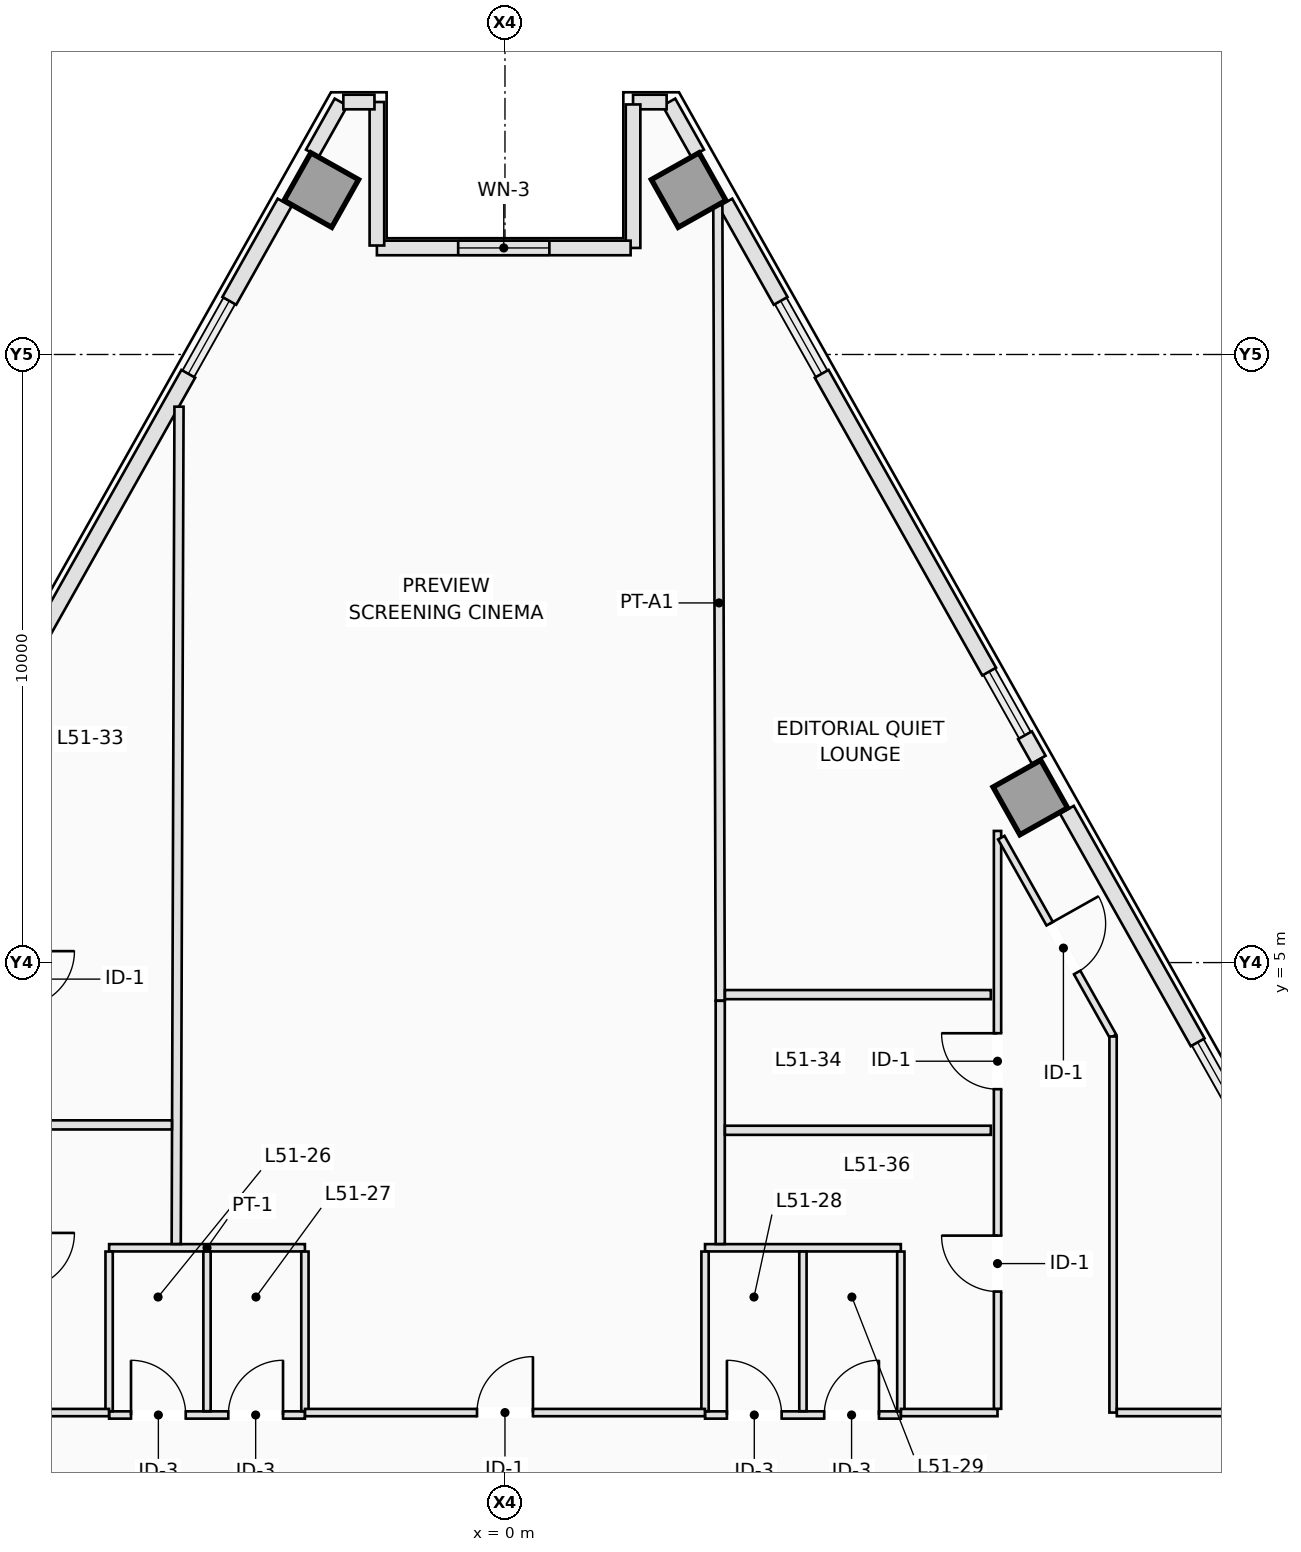
"""IFC4 building model, lengths in metres.
Left out: names, types, materials, properties, quantities, classifications, styles, units other than length and angle.
Written with IfcOpenShell. Run it as: python <this file> out.ifc"""

import sys

from ifc_helpers import new_model, si_unit, direction, frame, frame_2d, origin, origin_2d, place, context, subcontext, project, spatial, rectangle, extrude, element, fill, save


model = new_model("IFC4")
c1 = context("Model", 3, precision=1e-05, world=origin(), true_north=direction((0.0, 1.0)))
c2 = subcontext(c1, "Body", "Model", "MODEL_VIEW")
j1 = project(units=[si_unit("LENGTHUNIT", "METRE"), si_unit("PLANEANGLEUNIT", "RADIAN")], contexts=[c1])
p1 = place(None, origin())
s1 = spatial("IfcSite", under=j1, at=p1, CompositionType="ELEMENT")
p2 = place(p1, origin())
s2 = spatial("IfcBuilding", under=s1, at=p2, CompositionType="ELEMENT")
p3 = place(p2, frame((0.0, 0.0, 186.9)))
s3 = spatial("IfcBuildingStorey", under=s2, at=p3, CompositionType="ELEMENT", Elevation=186.9)
for number, where, z_axis, x_axis in (
    (1, (8.64, 7.715, 0.0), (0.0, 0.0, 1.0), (0.872, 0.49, 0.0)),
    (2, (3.021, 17.704, 0.0), (0.0, 0.0, 1.0), (0.872, 0.49, 0.0)),
    (3, (-3.021, 17.704, 0.0), (0.0, 0.0, 1.0), (-0.872, 0.49, 0.0)),
):
    element("IfcColumn", number, at=place(p3, frame(where, z_axis=z_axis, x_axis=x_axis)), inside=s3, PredefinedType="COLUMN", context=c2, shape_type="SweptSolid", body=[
        extrude(rectangle(XDim=0.9, YDim=0.9, at=origin_2d()), origin(), (0.0, 0.0, 1.0), 3.5),
    ])
p4 = place(p3, frame((2.695, 19.149, 0.0), z_axis=(0.0, 0.0, 1.0), x_axis=(0.490345412687, -0.87152818443, 0.0)))
e4 = element("IfcWall", 4, at=p4, inside=s3, PredefinedType="STANDARD", context=c2, shape_type="SweptSolid", body=[
    extrude(rectangle(XDim=0.964, YDim=0.24, at=frame_2d((0.482, 0.0))), origin(), (0.0, 0.0, 1.0), 3.25),
])
p5 = place(p3, frame((3.624, 17.499, 0.0), z_axis=(0.0, 0.0, 1.0), x_axis=(0.490261239633, -0.871575537125, 0.0)))
e5 = element("IfcWall", 5, at=p5, inside=s3, PredefinedType="STANDARD", context=c2, shape_type="SweptSolid", body=[
    extrude(rectangle(XDim=1.855, YDim=0.26, at=frame_2d((0.928, 0.0))), origin(), (0.0, 0.0, 1.0), 3.25),
])
p6 = place(p3, frame((5.208, 14.682, 0.0), z_axis=(0.0, 0.0, 1.0), x_axis=(0.490240608828, -0.871587141631, 0.0)))
e6 = element("IfcWall", 6, at=p6, inside=s3, PredefinedType="STANDARD", context=c2, shape_type="SweptSolid", body=[
    extrude(rectangle(XDim=5.618, YDim=0.26, at=frame_2d((2.809, 0.0))), origin(), (0.0, 0.0, 1.0), 3.25),
])
p7 = place(p3, frame((8.552, 8.738, 0.0), z_axis=(0.0, 0.0, 1.0), x_axis=(0.490412424957, -0.871490478116, 0.0)))
e7 = element("IfcWall", 7, at=p7, inside=s3, PredefinedType="STANDARD", context=c2, shape_type="SweptSolid", body=[
    extrude(rectangle(XDim=0.46, YDim=0.26, at=frame_2d((0.23, 0.0))), origin(), (0.0, 0.0, 1.0), 3.25),
])
p8 = place(p3, frame((9.24, 7.514, 0.0), z_axis=(0.0, 0.0, 1.0), x_axis=(0.490237464814, -0.871588910033, 0.0)))
e8 = element("IfcWall", 8, at=p8, inside=s3, PredefinedType="STANDARD", context=c2, shape_type="SweptSolid", body=[
    extrude(rectangle(XDim=4.388, YDim=0.26, at=frame_2d((2.194, 0.0))), origin(), (0.0, 0.0, 1.0), 3.25),
])
p9 = place(p3, frame((-3.168, 18.309, 0.0), z_axis=(0.0, 0.0, 1.0), x_axis=(0.490345412687, 0.87152818443, 0.0)))
e9 = element("IfcWall", 9, at=p9, inside=s3, PredefinedType="STANDARD", context=c2, shape_type="SweptSolid", body=[
    extrude(rectangle(XDim=0.964, YDim=0.24, at=frame_2d((0.482, 0.0))), origin(), (0.0, 0.0, 1.0), 3.25),
])
p10 = place(p3, frame((-7.962, 9.785, 0.0), z_axis=(0.0, 0.0, 1.0), x_axis=(0.490240608828, 0.871587141631, 0.0)))
e10 = element("IfcWall", 10, at=p10, inside=s3, PredefinedType="STANDARD", context=c2, shape_type="SweptSolid", body=[
    extrude(rectangle(XDim=5.618, YDim=0.26, at=frame_2d((2.809, 0.0))), origin(), (0.0, 0.0, 1.0), 3.25),
])
p11 = place(p3, frame((-4.533, 15.882, 0.0), z_axis=(0.0, 0.0, 1.0), x_axis=(0.490261239633, 0.871575537125, 0.0)))
e11 = element("IfcWall", 11, at=p11, inside=s3, PredefinedType="STANDARD", context=c2, shape_type="SweptSolid", body=[
    extrude(rectangle(XDim=1.855, YDim=0.26, at=frame_2d((0.928, 0.0))), origin(), (0.0, 0.0, 1.0), 3.25),
])
p12 = place(p3, frame((2.658, 19.152, 0.0), z_axis=(0.0, 0.0, 1.0), x_axis=(-1.0, 0.0, 0.0)))
e12 = element("IfcWall", 12, at=p12, inside=s3, PredefinedType="STANDARD", context=c2, shape_type="SweptSolid", body=[
    extrude(rectangle(XDim=0.552, YDim=0.24, at=frame_2d((0.276, 0.0))), origin(), (0.0, 0.0, 1.0), 3.25),
])
p13 = place(p3, frame((2.106, 19.112, 0.0), z_axis=(0.0, 0.0, 1.0), x_axis=(0.0, -1.0, 0.0)))
e13 = element("IfcWall", 13, at=p13, inside=s3, PredefinedType="STANDARD", context=c2, shape_type="SweptSolid", body=[
    extrude(rectangle(XDim=2.36, YDim=0.24, at=frame_2d((1.18, 0.0))), origin(), (0.0, 0.0, 1.0), 3.25),
])
p14 = place(p3, frame((2.066, 16.752, 0.0), z_axis=(0.0, 0.0, 1.0), x_axis=(-1.0, 0.0, 0.0)))
e14 = element("IfcWall", 14, at=p14, inside=s3, PredefinedType="STANDARD", context=c2, shape_type="SweptSolid", body=[
    extrude(rectangle(XDim=4.172, YDim=0.24, at=frame_2d((2.086, 0.0))), origin(), (0.0, 0.0, 1.0), 3.25),
])
p15 = place(p14, frame((1.336, 0.0, 0.9)))
e15 = element("IfcOpeningElement", 15, at=p15, cuts=e14, PredefinedType="OPENING", context=c2, shape_type="SweptSolid", body=[
    extrude(rectangle(XDim=1.5, YDim=1.95, at=frame_2d((0.75, 0.975))), frame((0.0, 0.13, 0.0), z_axis=(0.0, -1.0, 0.0), x_axis=(1.0, 0.0, 0.0)), (0.0, 0.0, 1.0), 0.26),
])
p16 = place(p3, frame((-2.106, 16.792, 0.0), z_axis=(0.0, 0.0, 1.0), x_axis=(0.0, 1.0, 0.0)))
e16 = element("IfcWall", 16, at=p16, inside=s3, PredefinedType="STANDARD", context=c2, shape_type="SweptSolid", body=[
    extrude(rectangle(XDim=2.36, YDim=0.24, at=frame_2d((1.18, 0.0))), origin(), (0.0, 0.0, 1.0), 3.25),
])
p17 = place(p3, frame((-2.146, 19.152, 0.0), z_axis=(0.0, 0.0, 1.0), x_axis=(-1.0, 0.0, 0.0)))
e17 = element("IfcWall", 17, at=p17, inside=s3, PredefinedType="STANDARD", context=c2, shape_type="SweptSolid", body=[
    extrude(rectangle(XDim=0.512, YDim=0.24, at=frame_2d((0.256, 0.0))), origin(), (0.0, 0.0, 1.0), 3.25),
])
p18 = place(p3, frame((-6.51, -2.44, 0.0), z_axis=(0.0, 0.0, 1.0), x_axis=(1.0, 0.0, 0.0)))
e18 = element("IfcWall", 18, at=p18, inside=s3, PredefinedType="PARTITIONING", context=c2, shape_type="SweptSolid", body=[
    extrude(rectangle(XDim=3.22, YDim=0.12, at=frame_2d((1.61, 0.0))), origin(), (0.0, 0.0, 1.0), 2.943),
])
p19 = place(p18, frame((0.36, 0.0, 0.0)))
e19 = element("IfcOpeningElement", 19, at=p19, cuts=e18, PredefinedType="OPENING", context=c2, shape_type="SweptSolid", body=[
    extrude(rectangle(XDim=0.9, YDim=2.12, at=frame_2d((0.45, 1.06))), frame((0.0, 0.07, 0.0), z_axis=(0.0, -1.0, 0.0), x_axis=(1.0, 0.0, 0.0)), (0.0, 0.0, 1.0), 0.14),
])
p20 = place(p18, frame((1.96, 0.0, 0.0)))
e20 = element("IfcOpeningElement", 20, at=p20, cuts=e18, PredefinedType="OPENING", context=c2, shape_type="SweptSolid", body=[
    extrude(rectangle(XDim=0.9, YDim=2.12, at=frame_2d((0.45, 1.06))), frame((0.0, 0.07, 0.0), z_axis=(0.0, -1.0, 0.0), x_axis=(1.0, 0.0, 0.0)), (0.0, 0.0, 1.0), 0.14),
])
p21 = place(p3, frame((-6.51, 0.31, 0.0), z_axis=(0.0, 0.0, 1.0), x_axis=(1.0, 0.0, 0.0)))
e21 = element("IfcWall", 21, at=p21, inside=s3, PredefinedType="PARTITIONING", context=c2, shape_type="SweptSolid", body=[
    extrude(rectangle(XDim=3.22, YDim=0.12, at=frame_2d((1.61, 0.0))), origin(), (0.0, 0.0, 1.0), 3.25),
])
for number, where, z_axis, x_axis in (
    (22, (-6.51, -2.378, 0.0), (0.0, 0.0, 1.0), (0.0, 1.0, 0.0)),
    (23, (-4.9, -2.378, 0.0), (0.0, 0.0, 1.0), (0.0, 1.0, 0.0)),
    (24, (-3.29, -2.378, 0.0), (0.0, 0.0, 1.0), (0.0, 1.0, 0.0)),
):
    element("IfcWall", number, at=place(p3, frame(where, z_axis=z_axis, x_axis=x_axis)), inside=s3, PredefinedType="PARTITIONING", context=c2, shape_type="SweptSolid", body=[
        extrude(rectangle(XDim=2.626, YDim=0.12, at=frame_2d((1.313, 0.0))), origin(), (0.0, 0.0, 1.0), 3.25),
    ])
p22 = place(p3, frame((3.29, -2.44, 0.0), z_axis=(0.0, 0.0, 1.0), x_axis=(1.0, 0.0, 0.0)))
e25 = element("IfcWall", 25, at=p22, inside=s3, PredefinedType="PARTITIONING", context=c2, shape_type="SweptSolid", body=[
    extrude(rectangle(XDim=3.22, YDim=0.12, at=frame_2d((1.61, 0.0))), origin(), (0.0, 0.0, 1.0), 2.943),
])
p23 = place(p22, frame((0.36, 0.0, 0.0)))
e26 = element("IfcOpeningElement", 26, at=p23, cuts=e25, PredefinedType="OPENING", context=c2, shape_type="SweptSolid", body=[
    extrude(rectangle(XDim=0.9, YDim=2.12, at=frame_2d((0.45, 1.06))), frame((0.0, 0.07, 0.0), z_axis=(0.0, -1.0, 0.0), x_axis=(1.0, 0.0, 0.0)), (0.0, 0.0, 1.0), 0.14),
])
p24 = place(p22, frame((1.96, 0.0, 0.0)))
e27 = element("IfcOpeningElement", 27, at=p24, cuts=e25, PredefinedType="OPENING", context=c2, shape_type="SweptSolid", body=[
    extrude(rectangle(XDim=0.9, YDim=2.12, at=frame_2d((0.45, 1.06))), frame((0.0, 0.07, 0.0), z_axis=(0.0, -1.0, 0.0), x_axis=(1.0, 0.0, 0.0)), (0.0, 0.0, 1.0), 0.14),
])
p25 = place(p3, frame((3.29, 0.31, 0.0), z_axis=(0.0, 0.0, 1.0), x_axis=(1.0, 0.0, 0.0)))
e28 = element("IfcWall", 28, at=p25, inside=s3, PredefinedType="PARTITIONING", context=c2, shape_type="SweptSolid", body=[
    extrude(rectangle(XDim=3.22, YDim=0.12, at=frame_2d((1.61, 0.0))), origin(), (0.0, 0.0, 1.0), 3.25),
])
for number, where, z_axis, x_axis in (
    (29, (3.29, -2.378, 0.0), (0.0, 0.0, 1.0), (0.0, 1.0, 0.0)),
    (30, (4.9, -2.378, 0.0), (0.0, 0.0, 1.0), (0.0, 1.0, 0.0)),
    (31, (6.51, -2.378, 0.0), (0.0, 0.0, 1.0), (0.0, 1.0, 0.0)),
):
    element("IfcWall", number, at=place(p3, frame(where, z_axis=z_axis, x_axis=x_axis)), inside=s3, PredefinedType="PARTITIONING", context=c2, shape_type="SweptSolid", body=[
        extrude(rectangle(XDim=2.626, YDim=0.12, at=frame_2d((1.313, 0.0))), origin(), (0.0, 0.0, 1.0), 3.25),
    ])
p26 = place(p3, frame((-7.938, -2.4, 0.0), z_axis=(0.0, 0.0, 1.0), x_axis=(1.0, 0.0, 0.0)))
e32 = element("IfcWall", 32, at=p26, inside=s3, PredefinedType="PARTITIONING", context=c2, shape_type="SweptSolid", body=[
    extrude(rectangle(XDim=1.426, YDim=0.12, at=frame_2d((0.713, 0.0))), origin(), (0.0, 0.0, 1.0), 3.25),
])
p27 = place(p3, frame((-3.288, -2.4, 0.0), z_axis=(0.0, 0.0, 1.0), x_axis=(1.0, 0.0, 0.0)))
e33 = element("IfcWall", 33, at=p27, inside=s3, PredefinedType="PARTITIONING", context=c2, shape_type="SweptSolid", body=[
    extrude(rectangle(XDim=6.576, YDim=0.12, at=frame_2d((3.288, 0.0))), origin(), (0.0, 0.0, 1.0), 2.943),
])
p28 = place(p27, frame((2.828, 0.0, 0.0)))
e34 = element("IfcOpeningElement", 34, at=p28, cuts=e33, PredefinedType="OPENING", context=c2, shape_type="SweptSolid", body=[
    extrude(rectangle(XDim=0.92, YDim=2.12, at=frame_2d((0.46, 1.06))), frame((0.0, 0.07, 0.0), z_axis=(0.0, -1.0, 0.0), x_axis=(1.0, 0.0, 0.0)), (0.0, 0.0, 1.0), 0.14),
])
p29 = place(p3, frame((6.512, -2.4, 0.0), z_axis=(0.0, 0.0, 1.0), x_axis=(1.0, 0.0, 0.0)))
e35 = element("IfcWall", 35, at=p29, inside=s3, PredefinedType="PARTITIONING", context=c2, shape_type="SweptSolid", body=[
    extrude(rectangle(XDim=1.588, YDim=0.12, at=frame_2d((0.794, 0.0))), origin(), (0.0, 0.0, 1.0), 3.25),
])
p30 = place(p3, frame((8.1, -2.338, 0.0), z_axis=(0.0, 0.0, 1.0), x_axis=(0.0, 1.0, 0.0)))
e36 = element("IfcWall", 36, at=p30, inside=s3, PredefinedType="PARTITIONING", context=c2, shape_type="SweptSolid", body=[
    extrude(rectangle(XDim=9.503, YDim=0.12, at=frame_2d((4.751, 0.0))), origin(), (0.0, 0.0, 1.0), 3.25),
])
p31 = place(p30, frame((5.256, 0.0, 0.0)))
e37 = element("IfcOpeningElement", 37, at=p31, cuts=e36, PredefinedType="OPENING", context=c2, shape_type="SweptSolid", body=[
    extrude(rectangle(XDim=0.92, YDim=2.12, at=frame_2d((0.46, 1.06))), frame((0.0, 0.07, 0.0), z_axis=(0.0, -1.0, 0.0), x_axis=(1.0, 0.0, 0.0)), (0.0, 0.0, 1.0), 0.14),
])
p32 = place(p30, frame((1.928, 0.0, 0.0)))
e38 = element("IfcOpeningElement", 38, at=p32, cuts=e36, PredefinedType="OPENING", context=c2, shape_type="SweptSolid", body=[
    extrude(rectangle(XDim=0.92, YDim=2.12, at=frame_2d((0.46, 1.06))), frame((0.0, 0.07, 0.0), z_axis=(0.0, -1.0, 0.0), x_axis=(1.0, 0.0, 0.0)), (0.0, 0.0, 1.0), 0.14),
])
p33 = place(p3, frame((8.162, 7.055, 0.0), z_axis=(0.0, 0.0, 1.0), x_axis=(0.490236504766, -0.871589450025, 0.0)))
e39 = element("IfcWall", 39, at=p33, inside=s3, PredefinedType="PARTITIONING", context=c2, shape_type="SweptSolid", body=[
    extrude(rectangle(XDim=3.749, YDim=0.12, at=frame_2d((1.875, 0.0))), origin(), (0.0, 0.0, 1.0), 3.25),
])
p34 = place(p33, frame((1.624, 0.0, 0.0)))
e40 = element("IfcOpeningElement", 40, at=p34, cuts=e39, PredefinedType="OPENING", context=c2, shape_type="SweptSolid", body=[
    extrude(rectangle(XDim=0.92, YDim=2.12, at=frame_2d((0.46, 1.06))), frame((0.0, 0.07, 0.0), z_axis=(0.0, -1.0, 0.0), x_axis=(1.0, 0.0, 0.0)), (0.0, 0.0, 1.0), 0.14),
])
p35 = place(p3, frame((10.0, 3.785, 0.0), z_axis=(0.0, 0.0, 1.0), x_axis=(0.0, -1.0, 0.0)))
e41 = element("IfcWall", 41, at=p35, inside=s3, PredefinedType="PARTITIONING", context=c2, shape_type="SweptSolid", body=[
    extrude(rectangle(XDim=6.185, YDim=0.12, at=frame_2d((3.092, 0.0))), origin(), (0.0, 0.0, 1.0), 3.25),
])
p36 = place(p3, frame((10.062, -2.4, 0.0), z_axis=(0.0, 0.0, 1.0), x_axis=(1.0, 0.0, 0.0)))
e42 = element("IfcWall", 42, at=p36, inside=s3, PredefinedType="PARTITIONING", context=c2, shape_type="SweptSolid", body=[
    extrude(rectangle(XDim=2.348, YDim=0.12, at=frame_2d((1.174, 0.0))), origin(), (0.0, 0.0, 1.0), 3.25),
])
p37 = place(p3, frame((3.54, 4.373, 0.0), z_axis=(0.0, 0.0, 1.0), x_axis=(-0.003041825214, 0.999995373639, 0.0)))
e43 = element("IfcWall", 43, at=p37, inside=s3, PredefinedType="PARTITIONING", context=c2, shape_type="SweptSolid", body=[
    extrude(rectangle(XDim=13.083, YDim=0.15, at=frame_2d((6.541, 0.0))), origin(), (0.0, 0.0, 1.0), 2.722),
])
p38 = place(p3, frame((7.99, 4.473, 0.0), z_axis=(0.0, 0.0, 1.0), x_axis=(-1.0, 0.0, 0.0)))
e44 = element("IfcWall", 44, at=p38, inside=s3, PredefinedType="PARTITIONING", context=c2, shape_type="SweptSolid", body=[
    extrude(rectangle(XDim=4.373, YDim=0.15, at=frame_2d((2.187, 0.0))), origin(), (0.0, 0.0, 1.0), 3.25),
])
p39 = place(p3, frame((-5.406, 0.372, 0.0), z_axis=(0.0, 0.0, 1.0), x_axis=(0.003333314815, 0.999994444491, 0.0)))
e45 = element("IfcWall", 45, at=p39, inside=s3, PredefinedType="PARTITIONING", context=c2, shape_type="SweptSolid", body=[
    extrude(rectangle(XDim=13.77, YDim=0.15, at=frame_2d((6.885, 0.0))), origin(), (0.0, 0.0, 1.0), 3.25),
])
p40 = place(p3, frame((3.54, 4.371, 0.0), z_axis=(0.0, 0.0, 1.0), x_axis=(0.0, -1.0, 0.0)))
e46 = element("IfcWall", 46, at=p40, inside=s3, PredefinedType="PARTITIONING", context=c2, shape_type="SweptSolid", body=[
    extrude(rectangle(XDim=3.999, YDim=0.15, at=frame_2d((2.0, 0.0))), origin(), (0.0, 0.0, 1.0), 2.722),
])
p41 = place(p3, frame((-5.477, 2.331, 0.0), z_axis=(0.0, 0.0, 1.0), x_axis=(-1.0, 0.0, 0.0)))
e47 = element("IfcWall", 47, at=p41, inside=s3, PredefinedType="PARTITIONING", context=c2, shape_type="SweptSolid", body=[
    extrude(rectangle(XDim=2.413, YDim=0.15, at=frame_2d((1.207, 0.0))), origin(), (0.0, 0.0, 1.0), 3.25),
])
p42 = place(p3, frame((7.99, 2.242, 0.0), z_axis=(0.0, 0.0, 1.0), x_axis=(-1.0, 0.0, 0.0)))
e48 = element("IfcWall", 48, at=p42, inside=s3, PredefinedType="PARTITIONING", context=c2, shape_type="SweptSolid", body=[
    extrude(rectangle(XDim=4.373, YDim=0.15, at=frame_2d((2.187, 0.0))), origin(), (0.0, 0.0, 1.0), 3.25),
])
p43 = place(p15, origin())
e49 = element("IfcWindow", 49, at=p43, inside=s3, PartitioningType="SINGLE_PANEL", PredefinedType="WINDOW", context=c2, shape_type="SweptSolid", body=[
    extrude(rectangle(XDim=1.5, YDim=1.95, at=frame_2d((0.75, 0.975))), frame((0.0, 0.03, 0.0), z_axis=(0.0, -1.0, 0.0), x_axis=(1.0, 0.0, 0.0)), (0.0, 0.0, 1.0), 0.06),
])
fill(e15, e49)
p44 = place(p19, origin())
e50 = element("IfcDoor", 50, at=p44, inside=s3, OperationType="SINGLE_SWING_LEFT", PredefinedType="DOOR", context=c2, shape_type="SweptSolid", body=[
    extrude(rectangle(XDim=0.9, YDim=2.12, at=frame_2d((0.45, 1.06))), frame((0.0, 0.025, 0.0), z_axis=(0.0, -1.0, 0.0), x_axis=(1.0, 0.0, 0.0)), (0.0, 0.0, 1.0), 0.05),
])
fill(e19, e50)
p45 = place(p20, origin())
e51 = element("IfcDoor", 51, at=p45, inside=s3, OperationType="SINGLE_SWING_RIGHT", PredefinedType="DOOR", context=c2, shape_type="SweptSolid", body=[
    extrude(rectangle(XDim=0.9, YDim=2.12, at=frame_2d((0.45, 1.06))), frame((0.0, 0.025, 0.0), z_axis=(0.0, -1.0, 0.0), x_axis=(1.0, 0.0, 0.0)), (0.0, 0.0, 1.0), 0.05),
])
fill(e20, e51)
p46 = place(p23, origin())
e52 = element("IfcDoor", 52, at=p46, inside=s3, OperationType="SINGLE_SWING_LEFT", PredefinedType="DOOR", context=c2, shape_type="SweptSolid", body=[
    extrude(rectangle(XDim=0.9, YDim=2.12, at=frame_2d((0.45, 1.06))), frame((0.0, 0.025, 0.0), z_axis=(0.0, -1.0, 0.0), x_axis=(1.0, 0.0, 0.0)), (0.0, 0.0, 1.0), 0.05),
])
fill(e26, e52)
p47 = place(p24, origin())
e53 = element("IfcDoor", 53, at=p47, inside=s3, OperationType="SINGLE_SWING_RIGHT", PredefinedType="DOOR", context=c2, shape_type="SweptSolid", body=[
    extrude(rectangle(XDim=0.9, YDim=2.12, at=frame_2d((0.45, 1.06))), frame((0.0, 0.025, 0.0), z_axis=(0.0, -1.0, 0.0), x_axis=(1.0, 0.0, 0.0)), (0.0, 0.0, 1.0), 0.05),
])
fill(e27, e53)
p48 = place(p34, origin())
e54 = element("IfcDoor", 54, at=p48, inside=s3, OperationType="SINGLE_SWING_LEFT", PredefinedType="DOOR", context=c2, shape_type="SweptSolid", body=[
    extrude(rectangle(XDim=0.92, YDim=2.12, at=frame_2d((0.46, 1.06))), frame((0.0, 0.025, 0.0), z_axis=(0.0, -1.0, 0.0), x_axis=(1.0, 0.0, 0.0)), (0.0, 0.0, 1.0), 0.05),
])
fill(e40, e54)
p49 = place(p28, origin())
e55 = element("IfcDoor", 55, at=p49, inside=s3, OperationType="SINGLE_SWING_RIGHT", PredefinedType="DOOR", context=c2, shape_type="SweptSolid", body=[
    extrude(rectangle(XDim=0.92, YDim=2.12, at=frame_2d((0.46, 1.06))), frame((0.0, 0.025, 0.0), z_axis=(0.0, -1.0, 0.0), x_axis=(1.0, 0.0, 0.0)), (0.0, 0.0, 1.0), 0.05),
])
fill(e34, e55)
p50 = place(p31, origin())
e56 = element("IfcDoor", 56, at=p50, inside=s3, OperationType="SINGLE_SWING_RIGHT", PredefinedType="DOOR", context=c2, shape_type="SweptSolid", body=[
    extrude(rectangle(XDim=0.92, YDim=2.12, at=frame_2d((0.46, 1.06))), frame((0.0, 0.025, 0.0), z_axis=(0.0, -1.0, 0.0), x_axis=(1.0, 0.0, 0.0)), (0.0, 0.0, 1.0), 0.05),
])
fill(e37, e56)
p51 = place(p32, origin())
e57 = element("IfcDoor", 57, at=p51, inside=s3, OperationType="SINGLE_SWING_RIGHT", PredefinedType="DOOR", context=c2, shape_type="SweptSolid", body=[
    extrude(rectangle(XDim=0.92, YDim=2.12, at=frame_2d((0.46, 1.06))), frame((0.0, 0.025, 0.0), z_axis=(0.0, -1.0, 0.0), x_axis=(1.0, 0.0, 0.0)), (0.0, 0.0, 1.0), 0.05),
])
fill(e38, e57)
save(model, sys.argv[1])
